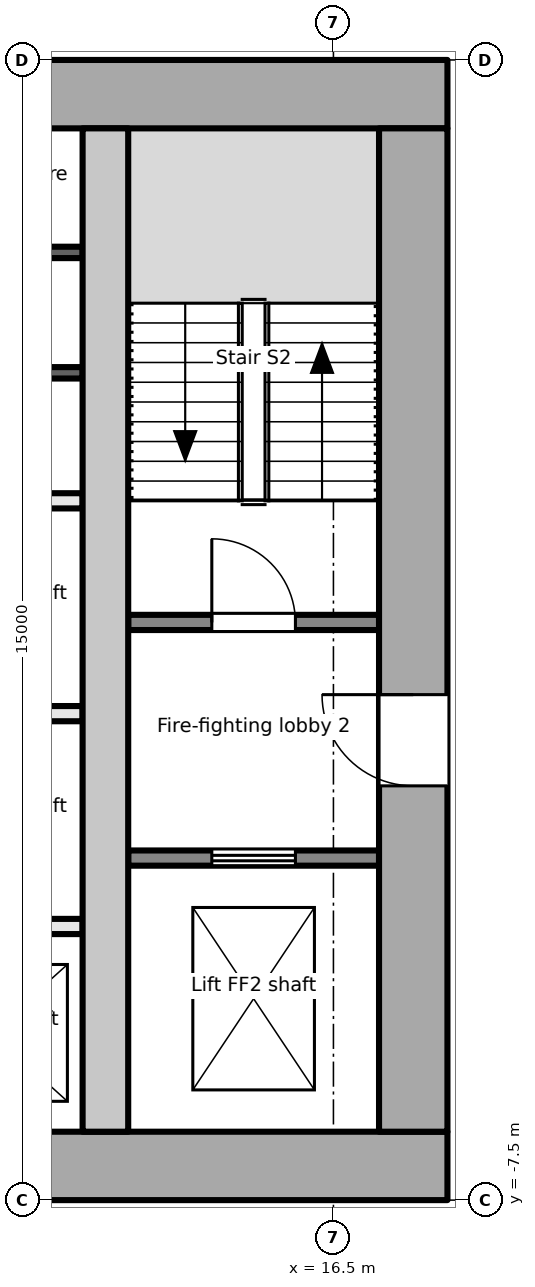
"""IFC4 building model, lengths in metres.
Left out: names, types, materials, properties, quantities, classifications, styles, units other than length and angle.
Written with IfcOpenShell. Run it as: python <this file> out.ifc"""

import sys

from ifc_helpers import new_model, si_unit, direction, frame, frame_2d, origin, place, context, subcontext, project, spatial, rectangle, extrude, element, fill, save


model = new_model("IFC4")
c1 = context("Model", 3, precision=1e-05, world=origin(), true_north=direction((0.0, 1.0)))
c2 = subcontext(c1, "Body", "Model", "MODEL_VIEW")
j1 = project(units=[si_unit("LENGTHUNIT", "METRE"), si_unit("PLANEANGLEUNIT", "RADIAN")], contexts=[c1])
p1 = place(None, origin())
s1 = spatial("IfcSite", under=j1, at=p1, CompositionType="ELEMENT")
p2 = place(p1, origin())
s2 = spatial("IfcBuilding", under=s1, at=p2, CompositionType="ELEMENT")
p3 = place(p2, frame((0.0, 0.0, 32.4)))
s3 = spatial("IfcBuildingStorey", under=s2, at=p3, CompositionType="ELEMENT", Elevation=32.4)
p4 = place(p3, frame((-18.0, -7.05, -0.2), z_axis=(0.0, 0.0, 1.0), x_axis=(1.0, 0.0, 0.0)))
e1 = element("IfcWall", 1, at=p4, inside=s3, PredefinedType="SHEAR", context=c2, shape_type="SweptSolid", body=[
    extrude(rectangle(XDim=36.0, YDim=0.9, at=frame_2d((18.0, 0.0))), origin(), (0.0, 0.0, 1.0), 4.1),
])
p5 = place(p4, frame((7.8, 0.0, 0.2)))
e2 = element("IfcOpeningElement", 2, at=p5, cuts=e1, PredefinedType="OPENING", context=c2, shape_type="SweptSolid", body=[
    extrude(rectangle(XDim=2.4, YDim=2.1, at=frame_2d((1.2, 1.05))), frame((0.0, 0.46, 0.0), z_axis=(0.0, -1.0, 0.0), x_axis=(1.0, 0.0, 0.0)), (0.0, 0.0, 1.0), 0.921),
])
p6 = place(p4, frame((17.4, 0.0, 0.2)))
e3 = element("IfcOpeningElement", 3, at=p6, cuts=e1, PredefinedType="OPENING", context=c2, shape_type="SweptSolid", body=[
    extrude(rectangle(XDim=1.2, YDim=2.1, at=frame_2d((0.6, 1.05))), frame((0.0, 0.46, 0.0), z_axis=(0.0, -1.0, 0.0), x_axis=(1.0, 0.0, 0.0)), (0.0, 0.0, 1.0), 0.921),
])
p7 = place(p4, frame((26.1, 0.0, 0.2)))
e4 = element("IfcOpeningElement", 4, at=p7, cuts=e1, PredefinedType="OPENING", context=c2, shape_type="SweptSolid", body=[
    extrude(rectangle(XDim=2.4, YDim=2.1, at=frame_2d((1.2, 1.05))), frame((0.0, 0.46, 0.0), z_axis=(0.0, -1.0, 0.0), x_axis=(1.0, 0.0, 0.0)), (0.0, 0.0, 1.0), 0.921),
])
p8 = place(p3, frame((-18.0, 7.05, -0.2), z_axis=(0.0, 0.0, 1.0), x_axis=(1.0, 0.0, 0.0)))
e5 = element("IfcWall", 5, at=p8, inside=s3, PredefinedType="SHEAR", context=c2, shape_type="SweptSolid", body=[
    extrude(rectangle(XDim=36.0, YDim=0.9, at=frame_2d((18.0, 0.0))), origin(), (0.0, 0.0, 1.0), 4.1),
])
p9 = place(p3, frame((17.55, -6.6, -0.2), z_axis=(0.0, 0.0, 1.0), x_axis=(0.0, 1.0, 0.0)))
e6 = element("IfcWall", 6, at=p9, inside=s3, PredefinedType="SHEAR", context=c2, shape_type="SweptSolid", body=[
    extrude(rectangle(XDim=13.2, YDim=0.9, at=frame_2d((6.6, 0.0))), origin(), (0.0, 0.0, 1.0), 4.1),
])
p10 = place(p9, frame((4.55, 0.0, 0.2)))
e7 = element("IfcOpeningElement", 7, at=p10, cuts=e6, PredefinedType="OPENING", context=c2, shape_type="SweptSolid", body=[
    extrude(rectangle(XDim=1.2, YDim=2.1, at=frame_2d((0.6, 1.05))), frame((0.0, 0.46, 0.0), z_axis=(0.0, -1.0, 0.0), x_axis=(1.0, 0.0, 0.0)), (0.0, 0.0, 1.0), 0.921),
])
p11 = place(p3, frame((13.5, -6.6, -0.2), z_axis=(0.0, 0.0, 1.0), x_axis=(0.0, 1.0, 0.0)))
e8 = element("IfcWall", 8, at=p11, inside=s3, PredefinedType="SHEAR", context=c2, shape_type="SweptSolid", body=[
    extrude(rectangle(XDim=13.2, YDim=0.6, at=frame_2d((6.6, 0.0))), origin(), (0.0, 0.0, 1.0), 4.1),
])
p12 = place(p3, frame((13.8, -3.0, 0.0), z_axis=(0.0, 0.0, 1.0), x_axis=(1.0, 0.0, 0.0)))
e9 = element("IfcWall", 9, at=p12, inside=s3, PredefinedType="PARTITIONING", context=c2, shape_type="SweptSolid", body=[
    extrude(rectangle(XDim=3.3, YDim=0.2, at=frame_2d((1.65, 0.0))), origin(), (0.0, 0.0, 1.0), 3.9),
])
p13 = place(p12, frame((1.1, 0.0, 0.0)))
e10 = element("IfcOpeningElement", 10, at=p13, cuts=e9, PredefinedType="OPENING", context=c2, shape_type="SweptSolid", body=[
    extrude(rectangle(XDim=1.1, YDim=2.1, at=frame_2d((0.55, 1.05))), frame((0.0, 0.111, 0.0), z_axis=(0.0, -1.0, 0.0), x_axis=(1.0, 0.0, 0.0)), (0.0, 0.0, 1.0), 0.221),
])
p14 = place(p3, frame((13.8, 0.1, 0.0), z_axis=(0.0, 0.0, 1.0), x_axis=(1.0, 0.0, 0.0)))
e11 = element("IfcWall", 11, at=p14, inside=s3, PredefinedType="PARTITIONING", context=c2, shape_type="SweptSolid", body=[
    extrude(rectangle(XDim=3.3, YDim=0.2, at=frame_2d((1.65, 0.0))), origin(), (0.0, 0.0, 1.0), 3.9),
])
p15 = place(p14, frame((1.1, 0.0, 0.0)))
e12 = element("IfcOpeningElement", 12, at=p15, cuts=e11, PredefinedType="OPENING", context=c2, shape_type="SweptSolid", body=[
    extrude(rectangle(XDim=1.1, YDim=2.1, at=frame_2d((0.55, 1.05))), frame((0.0, 0.111, 0.0), z_axis=(0.0, -1.0, 0.0), x_axis=(1.0, 0.0, 0.0)), (0.0, 0.0, 1.0), 0.221),
])
for number, where, z_axis, x_axis in (
    (13, (10.9, -3.9, 0.0), (0.0, 0.0, 1.0), (1.0, 0.0, 0.0)),
    (14, (10.9, -1.1, 0.0), (0.0, 0.0, 1.0), (1.0, 0.0, 0.0)),
    (15, (10.9, 1.7, 0.0), (0.0, 0.0, 1.0), (1.0, 0.0, 0.0)),
):
    element("IfcWall", number, at=place(p3, frame(where, z_axis=z_axis, x_axis=x_axis)), inside=s3, PredefinedType="PARTITIONING", context=c2, shape_type="SweptSolid", body=[
        extrude(rectangle(XDim=2.3, YDim=0.2, at=frame_2d((1.15, 0.0))), origin(), (0.0, 0.0, 1.0), 3.9),
    ])
for number, where, z_axis, x_axis in (
    (16, (10.9, 3.384, 0.0), (0.0, 0.0, 1.0), (1.0, 0.0, 0.0)),
    (17, (10.9, 4.968, 0.0), (0.0, 0.0, 1.0), (1.0, 0.0, 0.0)),
):
    element("IfcWall", number, at=place(p3, frame(where, z_axis=z_axis, x_axis=x_axis)), inside=s3, PredefinedType="PARTITIONING", context=c2, shape_type="SweptSolid", body=[
        extrude(rectangle(XDim=2.3, YDim=0.15, at=frame_2d((1.15, 0.0))), origin(), (0.0, 0.0, 1.0), 3.9),
    ])
p16 = place(p13, origin())
e18 = element("IfcDoor", 18, at=p16, inside=s3, OperationType="DOUBLE_DOOR_SLIDING", PredefinedType="DOOR", context=c2, shape_type="SweptSolid", body=[
    extrude(rectangle(XDim=1.1, YDim=2.1, at=frame_2d((0.55, 1.05))), frame((0.0, 0.025, 0.0), z_axis=(0.0, -1.0, 0.0), x_axis=(1.0, 0.0, 0.0)), (0.0, 0.0, 1.0), 0.05),
])
fill(e10, e18)
p17 = place(p10, origin())
e19 = element("IfcDoor", 19, at=p17, inside=s3, OperationType="SINGLE_SWING_RIGHT", PredefinedType="DOOR", context=c2, shape_type="SweptSolid", body=[
    extrude(rectangle(XDim=1.2, YDim=2.1, at=frame_2d((0.6, 1.05))), frame((0.0, 0.025, 0.0), z_axis=(0.0, -1.0, 0.0), x_axis=(1.0, 0.0, 0.0)), (0.0, 0.0, 1.0), 0.05),
])
fill(e7, e19)
p18 = place(p15, origin())
e20 = element("IfcDoor", 20, at=p18, inside=s3, OperationType="SINGLE_SWING_LEFT", PredefinedType="DOOR", context=c2, shape_type="SweptSolid", body=[
    extrude(rectangle(XDim=1.1, YDim=2.1, at=frame_2d((0.55, 1.05))), frame((0.0, 0.025, 0.0), z_axis=(0.0, -1.0, 0.0), x_axis=(1.0, 0.0, 0.0)), (0.0, 0.0, 1.0), 0.05),
])
fill(e12, e20)
save(model, sys.argv[1])
